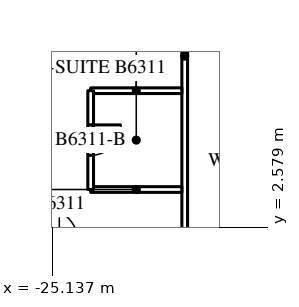
"""IFC4 building model, lengths in metres.
Left out: names, types, materials, properties, quantities, classifications, styles, units other than length and angle.
Written with IfcOpenShell. Run it as: python <this file> out.ifc"""

import sys

from ifc_helpers import new_model, si_unit, direction, frame, frame_2d, origin, place, context, subcontext, project, spatial, rectangle, extrude, element, fill, save


model = new_model("IFC4")
c1 = context("Model", 3, precision=1e-05, world=origin(), true_north=direction((0.0, 1.0)))
c2 = subcontext(c1, "Body", "Model", "MODEL_VIEW")
j1 = project(units=[si_unit("LENGTHUNIT", "METRE"), si_unit("PLANEANGLEUNIT", "RADIAN")], contexts=[c1])
p1 = place(None, origin())
s1 = spatial("IfcSite", under=j1, at=p1, CompositionType="ELEMENT")
p2 = place(p1, origin())
s2 = spatial("IfcBuilding", under=s1, at=p2, CompositionType="ELEMENT")
p3 = place(p2, frame((0.0, 0.0, 236.9)))
s3 = spatial("IfcBuildingStorey", under=s2, at=p3, CompositionType="ELEMENT", Elevation=236.9)
p4 = place(p3, frame((-21.65, 2.1, 0.0), z_axis=(0.0, 0.0, 1.0), x_axis=(0.0, 1.0, 0.0)))
e1 = element("IfcWall", 1, at=p4, inside=s3, PredefinedType="PARTITIONING", context=c2, shape_type="SweptSolid", body=[
    extrude(rectangle(XDim=9.97, YDim=0.15, at=frame_2d((4.985, 0.0))), origin(), (0.0, 0.0, 1.0), 3.4),
])
for number, where, z_axis, x_axis in (
    (2, (-24.125, 6.175, 0.0), (0.0, 0.0, 1.0), (1.0, 0.0, 0.0)),
    (3, (-24.125, 3.575, 0.0), (0.0, 0.0, 1.0), (1.0, 0.0, 0.0)),
):
    element("IfcWall", number, at=place(p3, frame(where, z_axis=z_axis, x_axis=x_axis)), inside=s3, PredefinedType="PARTITIONING", context=c2, shape_type="SweptSolid", body=[
        extrude(rectangle(XDim=2.4, YDim=0.15, at=frame_2d((1.2, 0.0))), origin(), (0.0, 0.0, 1.0), 3.4),
    ])
p5 = place(p3, frame((-24.125, 3.575, 0.0), z_axis=(0.0, 0.0, 1.0), x_axis=(0.0, 1.0, 0.0)))
e4 = element("IfcWall", 4, at=p5, inside=s3, PredefinedType="PARTITIONING", context=c2, shape_type="SweptSolid", body=[
    extrude(rectangle(XDim=2.6, YDim=0.15, at=frame_2d((1.3, 0.0))), origin(), (0.0, 0.0, 1.0), 3.4),
])
p6 = place(p5, frame((0.9, 0.0, 0.0)))
e5 = element("IfcOpeningElement", 5, at=p6, cuts=e4, PredefinedType="OPENING", context=c2, shape_type="SweptSolid", body=[
    extrude(rectangle(XDim=0.8, YDim=2.2, at=frame_2d((0.4, 1.1))), frame((0.0, 0.085, 0.0), z_axis=(0.0, -1.0, 0.0), x_axis=(1.0, 0.0, 0.0)), (0.0, 0.0, 1.0), 0.17),
])
p7 = place(p6, origin())
e6 = element("IfcDoor", 6, at=p7, inside=s3, OperationType="SINGLE_SWING_RIGHT", PredefinedType="DOOR", context=c2, shape_type="SweptSolid", body=[
    extrude(rectangle(XDim=0.8, YDim=2.2, at=frame_2d((0.4, 1.1))), frame((0.0, 0.025, 0.0), z_axis=(0.0, -1.0, 0.0), x_axis=(1.0, 0.0, 0.0)), (0.0, 0.0, 1.0), 0.05),
])
fill(e5, e6)
save(model, sys.argv[1])
